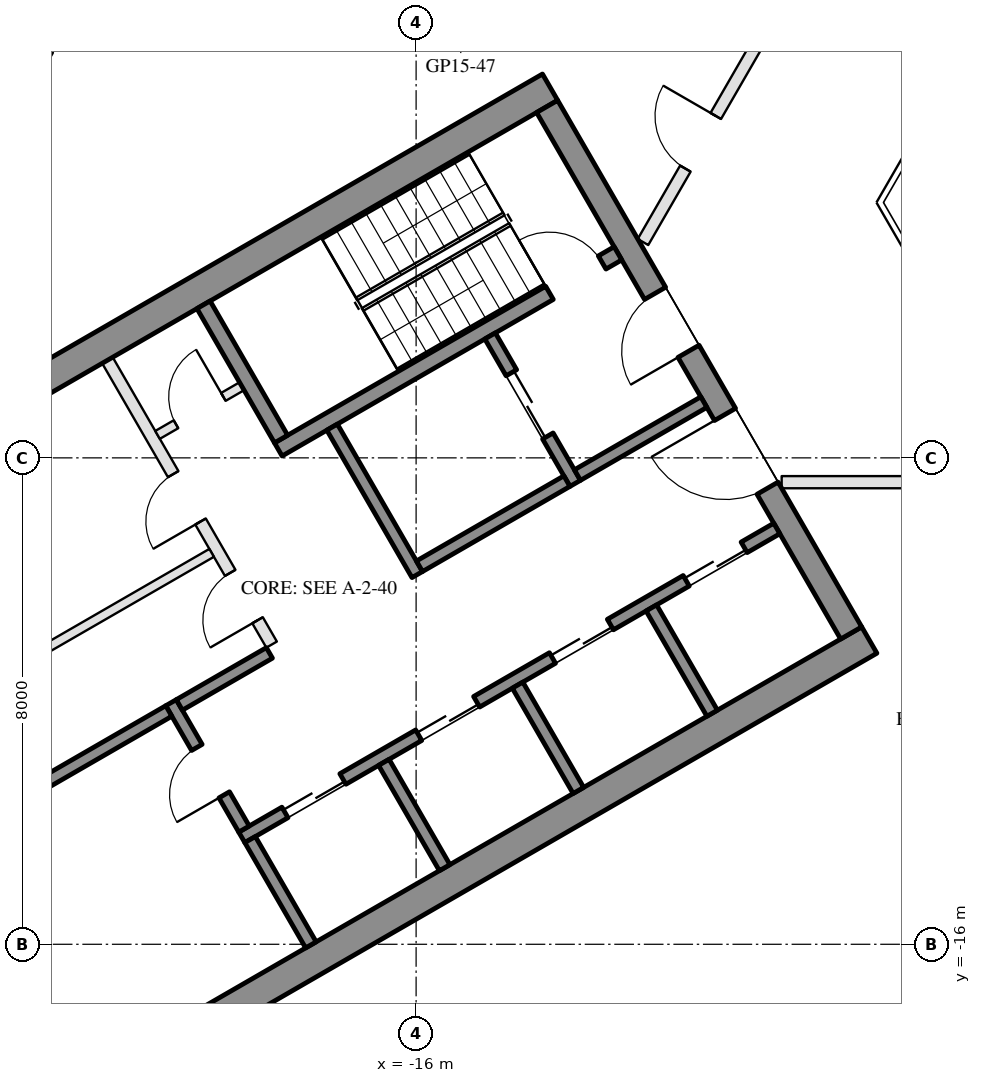
"""IFC4 building model, lengths in metres.
Left out: names, types, materials, properties, quantities, classifications, styles, units other than length and angle.
Written with IfcOpenShell. Run it as: python <this file> out.ifc"""

import sys

from ifc_helpers import new_model, si_unit, direction, frame, frame_2d, origin, place, context, subcontext, project, spatial, rectangle, extrude, element, fill, save


model = new_model("IFC4")
c1 = context("Model", 3, precision=1e-05, world=origin(), true_north=direction((0.0, 1.0)))
c2 = subcontext(c1, "Body", "Model", "MODEL_VIEW")
j1 = project(units=[si_unit("LENGTHUNIT", "METRE"), si_unit("PLANEANGLEUNIT", "RADIAN")], contexts=[c1])
p1 = place(None, origin())
s1 = spatial("IfcSite", under=j1, at=p1, CompositionType="ELEMENT")
p2 = place(p1, origin())
s2 = spatial("IfcBuilding", under=s1, at=p2, CompositionType="ELEMENT")
p3 = place(p2, frame((0.0, 0.0, 172.5)))
s3 = spatial("IfcBuildingStorey", under=s2, at=p3, CompositionType="ELEMENT", Elevation=172.5)
p4 = place(p3, frame((-20.309, 1.934, 0.0), z_axis=(0.0, 0.0, 1.0), x_axis=(-0.499992114976, -0.866029956157, 0.0)))
e1 = element("IfcWall", 1, at=p4, inside=s3, PredefinedType="SOLIDWALL", context=c2, shape_type="SweptSolid", body=[
    extrude(rectangle(XDim=6.74, YDim=0.35, at=frame_2d((3.37, 0.0))), origin(), (0.0, 0.0, 1.0), 3.55),
])
p5 = place(p4, frame((4.02, 0.0, 0.0)))
e2 = element("IfcOpeningElement", 2, at=p5, cuts=e1, PredefinedType="OPENING", context=c2, shape_type="SweptSolid", body=[
    extrude(rectangle(XDim=2.4, YDim=2.4, at=frame_2d((1.2, 1.2))), frame((0.0, 0.185, 0.0), z_axis=(0.0, -1.0, 0.0), x_axis=(1.0, 0.0, 0.0)), (0.0, 0.0, 1.0), 0.37),
])
p6 = place(p4, frame((0.77, 0.0, 0.3)))
e3 = element("IfcOpeningElement", 3, at=p6, cuts=e1, PredefinedType="OPENING", context=c2, shape_type="SweptSolid", body=[
    extrude(rectangle(XDim=2.9, YDim=2.65, at=frame_2d((1.45, 1.325))), frame((0.0, 0.185, 0.0), z_axis=(0.0, -1.0, 0.0), x_axis=(1.0, 0.0, 0.0)), (0.0, 0.0, 1.0), 0.37),
])
for number, where, z_axis, x_axis in (
    (4, (-13.797, -1.903, 0.0), (0.0, 0.0, 1.0), (-0.866, -0.5, 0.0)),
    (5, (-8.547, -10.997, 0.0), (0.0, 0.0, 1.0), (-0.866, -0.5, 0.0)),
):
    element("IfcWall", number, at=place(p3, frame(where, z_axis=z_axis, x_axis=x_axis)), inside=s3, PredefinedType="SHEAR", context=c2, shape_type="SweptSolid", body=[
        extrude(rectangle(XDim=14.837, YDim=0.5, at=frame_2d((7.418, 0.0))), origin(), (0.0, 0.0, 1.0), 3.5),
    ])
p7 = place(p3, frame((-13.845, -2.22, 0.0), z_axis=(0.0, 0.0, 1.0), x_axis=(0.500004234368, -0.866022959057, 0.0)))
e6 = element("IfcWall", 6, at=p7, inside=s3, PredefinedType="SHEAR", context=c2, shape_type="SweptSolid", body=[
    extrude(rectangle(XDim=10.0, YDim=0.4, at=frame_2d((5.0, 0.0))), origin(), (0.0, 0.0, 1.0), 3.5),
])
p8 = place(p7, frame((3.55, 0.0, 0.0)))
e7 = element("IfcOpeningElement", 7, at=p8, cuts=e6, PredefinedType="OPENING", context=c2, shape_type="SweptSolid", body=[
    extrude(rectangle(XDim=1.1, YDim=2.1, at=frame_2d((0.55, 1.05))), frame((0.0, 0.21, 0.0), z_axis=(0.0, -1.0, 0.0), x_axis=(1.0, 0.0, 0.0)), (0.0, 0.0, 1.0), 0.42),
])
p9 = place(p7, frame((5.85, 0.0, 0.0)))
e8 = element("IfcOpeningElement", 8, at=p9, cuts=e6, PredefinedType="OPENING", context=c2, shape_type="SweptSolid", body=[
    extrude(rectangle(XDim=1.4, YDim=2.1, at=frame_2d((0.7, 1.05))), frame((0.0, 0.21, 0.0), z_axis=(0.0, -1.0, 0.0), x_axis=(1.0, 0.0, 0.0)), (0.0, 0.0, 1.0), 0.42),
])
p10 = place(p3, frame((-12.681, -4.636, 0.0), z_axis=(0.0, 0.0, 1.0), x_axis=(-0.866021702275, -0.500006411147, 0.0)))
e9 = element("IfcWall", 9, at=p10, inside=s3, PredefinedType="SHEAR", context=c2, shape_type="SweptSolid", body=[
    extrude(rectangle(XDim=6.45, YDim=0.25, at=frame_2d((3.225, 0.0))), origin(), (0.0, 0.0, 1.0), 3.5),
])
p11 = place(p10, frame((0.3, 0.0, 0.0)))
e10 = element("IfcOpeningElement", 10, at=p11, cuts=e9, PredefinedType="OPENING", context=c2, shape_type="SweptSolid", body=[
    extrude(rectangle(XDim=1.0, YDim=2.1, at=frame_2d((0.5, 1.05))), frame((0.0, 0.135, 0.0), z_axis=(0.0, -1.0, 0.0), x_axis=(1.0, 0.0, 0.0)), (0.0, 0.0, 1.0), 0.27),
])
p12 = place(p3, frame((-19.496, -5.482, 0.0), z_axis=(0.0, 0.0, 1.0), x_axis=(0.499990435942, -0.866030925526, 0.0)))
e11 = element("IfcWall", 11, at=p12, inside=s3, PredefinedType="SHEAR", context=c2, shape_type="SweptSolid", body=[
    extrude(rectangle(XDim=2.55, YDim=0.25, at=frame_2d((1.275, 0.0))), origin(), (0.0, 0.0, 1.0), 3.5),
])
p13 = place(p3, frame((-17.381, -7.495, 0.0), z_axis=(0.0, 0.0, 1.0), x_axis=(0.500011755427, -0.866018616679, 0.0)))
e12 = element("IfcWall", 12, at=p13, inside=s3, PredefinedType="SHEAR", context=c2, shape_type="SweptSolid", body=[
    extrude(rectangle(XDim=2.8, YDim=0.2, at=frame_2d((1.4, 0.0))), origin(), (0.0, 0.0, 1.0), 3.5),
])
p14 = place(p3, frame((-14.783, -5.995, 0.0), z_axis=(0.0, 0.0, 1.0), x_axis=(0.49994636267, -0.866056369097, 0.0)))
e13 = element("IfcWall", 13, at=p14, inside=s3, PredefinedType="SHEAR", context=c2, shape_type="SweptSolid", body=[
    extrude(rectangle(XDim=2.8, YDim=0.2, at=frame_2d((1.4, 0.0))), origin(), (0.0, 0.0, 1.0), 3.5),
])
p15 = place(p14, frame((0.7, 0.0, 0.0)))
e14 = element("IfcOpeningElement", 14, at=p15, cuts=e13, PredefinedType="OPENING", context=c2, shape_type="SweptSolid", body=[
    extrude(rectangle(XDim=1.2, YDim=2.1, at=frame_2d((0.6, 1.05))), frame((0.0, 0.11, 0.0), z_axis=(0.0, -1.0, 0.0), x_axis=(1.0, 0.0, 0.0)), (0.0, 0.0, 1.0), 0.22),
])
p16 = place(p3, frame((-13.52, -8.383, 0.0), z_axis=(0.0, 0.0, 1.0), x_axis=(-0.866034573852, -0.49998411664, 0.0)))
e15 = element("IfcWall", 15, at=p16, inside=s3, PredefinedType="SHEAR", context=c2, shape_type="SweptSolid", body=[
    extrude(rectangle(XDim=2.8, YDim=0.2, at=frame_2d((1.4, 0.0))), origin(), (0.0, 0.0, 1.0), 3.5),
])
p17 = place(p3, frame((-11.268, -7.083, 0.0), z_axis=(0.0, 0.0, 1.0), x_axis=(-0.866050077142, -0.499957262057, 0.0)))
e16 = element("IfcWall", 16, at=p17, inside=s3, PredefinedType="SHEAR", context=c2, shape_type="SweptSolid", body=[
    extrude(rectangle(XDim=2.4, YDim=0.2, at=frame_2d((1.2, 0.0))), origin(), (0.0, 0.0, 1.0), 3.5),
])
p18 = place(p3, frame((-10.068, -9.162, 0.0), z_axis=(0.0, 0.0, 1.0), x_axis=(-0.866032725843, -0.499987317609, 0.0)))
e17 = element("IfcWall", 17, at=p18, inside=s3, PredefinedType="SHEAR", context=c2, shape_type="SweptSolid", body=[
    extrude(rectangle(XDim=10.16, YDim=0.2, at=frame_2d((5.08, 0.0))), origin(), (0.0, 0.0, 1.0), 3.5),
])
p19 = place(p18, frame((0.62, 0.0, 0.0)))
e18 = element("IfcOpeningElement", 18, at=p19, cuts=e17, PredefinedType="OPENING", context=c2, shape_type="SweptSolid", body=[
    extrude(rectangle(XDim=1.1, YDim=2.1, at=frame_2d((0.55, 1.05))), frame((0.0, 0.11, 0.0), z_axis=(0.0, -1.0, 0.0), x_axis=(1.0, 0.0, 0.0)), (0.0, 0.0, 1.0), 0.22),
])
p20 = place(p18, frame((3.16, 0.0, 0.0)))
e19 = element("IfcOpeningElement", 19, at=p20, cuts=e17, PredefinedType="OPENING", context=c2, shape_type="SweptSolid", body=[
    extrude(rectangle(XDim=1.1, YDim=2.1, at=frame_2d((0.55, 1.05))), frame((0.0, 0.11, 0.0), z_axis=(0.0, -1.0, 0.0), x_axis=(1.0, 0.0, 0.0)), (0.0, 0.0, 1.0), 0.22),
])
p21 = place(p18, frame((5.7, 0.0, 0.0)))
e20 = element("IfcOpeningElement", 20, at=p21, cuts=e17, PredefinedType="OPENING", context=c2, shape_type="SweptSolid", body=[
    extrude(rectangle(XDim=1.1, YDim=2.1, at=frame_2d((0.55, 1.05))), frame((0.0, 0.11, 0.0), z_axis=(0.0, -1.0, 0.0), x_axis=(1.0, 0.0, 0.0)), (0.0, 0.0, 1.0), 0.22),
])
p22 = place(p18, frame((8.24, 0.0, 0.0)))
e21 = element("IfcOpeningElement", 21, at=p22, cuts=e17, PredefinedType="OPENING", context=c2, shape_type="SweptSolid", body=[
    extrude(rectangle(XDim=1.1, YDim=2.1, at=frame_2d((0.55, 1.05))), frame((0.0, 0.11, 0.0), z_axis=(0.0, -1.0, 0.0), x_axis=(1.0, 0.0, 0.0)), (0.0, 0.0, 1.0), 0.22),
])
p23 = place(p3, frame((-20.031, -12.026, 0.0), z_axis=(0.0, 0.0, 1.0), x_axis=(0.500033551112, -0.866006032174, 0.0)))
e22 = element("IfcWall", 22, at=p23, inside=s3, PredefinedType="SHEAR", context=c2, shape_type="SweptSolid", body=[
    extrude(rectangle(XDim=2.4, YDim=0.2, at=frame_2d((1.2, 0.0))), origin(), (0.0, 0.0, 1.0), 3.5),
])
p24 = place(p23, frame((0.85, 0.0, 0.0)))
e23 = element("IfcOpeningElement", 23, at=p24, cuts=e22, PredefinedType="OPENING", context=c2, shape_type="SweptSolid", body=[
    extrude(rectangle(XDim=0.9, YDim=2.1, at=frame_2d((0.45, 1.05))), frame((0.0, 0.11, 0.0), z_axis=(0.0, -1.0, 0.0), x_axis=(1.0, 0.0, 0.0)), (0.0, 0.0, 1.0), 0.22),
])
p25 = place(p3, frame((-18.413, -11.208, 0.0), z_axis=(0.0, 0.0, 1.0), x_axis=(-0.866038183914, -0.499977863513, 0.0)))
e24 = element("IfcWall", 24, at=p25, inside=s3, PredefinedType="SHEAR", context=c2, shape_type="SweptSolid", body=[
    extrude(rectangle(XDim=1.71, YDim=0.2, at=frame_2d((0.855, 0.0))), origin(), (0.0, 0.0, 1.0), 3.5),
])
for number, where, z_axis, x_axis in (
    (25, (-12.131, -10.468, 0.0), (0.0, 0.0, 1.0), (0.5, -0.866, 0.0)),
    (26, (-14.331, -11.738, 0.0), (0.0, 0.0, 1.0), (0.5, -0.866, 0.0)),
    (27, (-16.531, -13.008, 0.0), (0.0, 0.0, 1.0), (0.5, -0.866, 0.0)),
    (28, (-18.73, -14.278, 0.0), (0.0, 0.0, 1.0), (0.5, -0.866, 0.0)),
):
    element("IfcWall", number, at=place(p3, frame(where, z_axis=z_axis, x_axis=x_axis)), inside=s3, PredefinedType="SHEAR", context=c2, shape_type="SweptSolid", body=[
        extrude(rectangle(XDim=2.0, YDim=0.2, at=frame_2d((1.0, 0.0))), origin(), (0.0, 0.0, 1.0), 3.5),
    ])
p26 = place(p3, frame((-20.067, -12.163, 0.0), z_axis=(0.0, 0.0, 1.0), x_axis=(-0.866055327414, -0.49994816717, 0.0)))
e29 = element("IfcWall", 29, at=p26, inside=s3, PredefinedType="SHEAR", context=c2, shape_type="SweptSolid", body=[
    extrude(rectangle(XDim=2.84, YDim=0.2, at=frame_2d((1.42, 0.0))), origin(), (0.0, 0.0, 1.0), 3.5),
])
p27 = place(p3, frame((-21.076, -6.395, 0.0), z_axis=(0.0, 0.0, 1.0), x_axis=(0.50001468107, -0.866016927499, 0.0)))
e30 = element("IfcWall", 30, at=p27, inside=s3, PredefinedType="PARTITIONING", context=c2, shape_type="SweptSolid", body=[
    extrude(rectangle(XDim=5.4, YDim=0.2, at=frame_2d((2.7, 0.0))), origin(), (0.0, 0.0, 1.0), 3.5),
])
p28 = place(p27, frame((2.163, 0.0, 0.0)))
e31 = element("IfcOpeningElement", 31, at=p28, cuts=e30, PredefinedType="OPENING", context=c2, shape_type="SweptSolid", body=[
    extrude(rectangle(XDim=0.9, YDim=2.1, at=frame_2d((0.45, 1.05))), frame((0.0, 0.11, 0.0), z_axis=(0.0, -1.0, 0.0), x_axis=(1.0, 0.0, 0.0)), (0.0, 0.0, 1.0), 0.22),
])
p29 = place(p27, frame((4.038, 0.0, 0.0)))
e32 = element("IfcOpeningElement", 32, at=p29, cuts=e30, PredefinedType="OPENING", context=c2, shape_type="SweptSolid", body=[
    extrude(rectangle(XDim=0.9, YDim=2.1, at=frame_2d((0.45, 1.05))), frame((0.0, 0.11, 0.0), z_axis=(0.0, -1.0, 0.0), x_axis=(1.0, 0.0, 0.0)), (0.0, 0.0, 1.0), 0.22),
])
p30 = place(p3, frame((-18.866, -6.822, 0.0), z_axis=(0.0, 0.0, 1.0), x_axis=(-0.866028054938, -0.499995408039, 0.0)))
e33 = element("IfcWall", 33, at=p30, inside=s3, PredefinedType="PARTITIONING", context=c2, shape_type="SweptSolid", body=[
    extrude(rectangle(XDim=1.6, YDim=0.15, at=frame_2d((0.8, 0.0))), origin(), (0.0, 0.0, 1.0), 3.5),
])
p31 = place(p30, frame((0.35, 0.0, 0.0)))
e34 = element("IfcOpeningElement", 34, at=p31, cuts=e33, PredefinedType="OPENING", context=c2, shape_type="SweptSolid", body=[
    extrude(rectangle(XDim=0.9, YDim=2.1, at=frame_2d((0.45, 1.05))), frame((0.0, 0.085, 0.0), z_axis=(0.0, -1.0, 0.0), x_axis=(1.0, 0.0, 0.0)), (0.0, 0.0, 1.0), 0.17),
])
p32 = place(p3, frame((-19.363, -9.562, 0.0), z_axis=(0.0, 0.0, 1.0), x_axis=(-0.866016523273, -0.500015381182, 0.0)))
e35 = element("IfcWall", 35, at=p32, inside=s3, PredefinedType="PARTITIONING", context=c2, shape_type="SweptSolid", body=[
    extrude(rectangle(XDim=6.95, YDim=0.15, at=frame_2d((3.475, 0.0))), origin(), (0.0, 0.0, 1.0), 3.5),
])
p33 = place(p3, frame((-3.697, -8.4, 0.0), z_axis=(0.0, 0.0, 1.0), x_axis=(-1.0, 0.0, 0.0)))
e36 = element("IfcWall", 36, at=p33, inside=s3, PredefinedType="PARTITIONING", context=c2, shape_type="SweptSolid", body=[
    extrude(rectangle(XDim=6.292, YDim=0.2, at=frame_2d((3.146, 0.0))), origin(), (0.0, 0.0, 1.0), 2.95),
])
p34 = place(p33, frame((2.646, 0.0, 0.0)))
e37 = element("IfcOpeningElement", 37, at=p34, cuts=e36, PredefinedType="OPENING", context=c2, shape_type="SweptSolid", body=[
    extrude(rectangle(XDim=1.0, YDim=2.1, at=frame_2d((0.5, 1.05))), frame((0.0, 0.11, 0.0), z_axis=(0.0, -1.0, 0.0), x_axis=(1.0, 0.0, 0.0)), (0.0, 0.0, 1.0), 0.22),
])
p35 = place(p3, frame((-12.269, -4.45, 0.0), z_axis=(0.0, 0.0, 1.0), x_axis=(0.500055316652, 0.865993464345, 0.0)))
e38 = element("IfcWall", 38, at=p35, inside=s3, PredefinedType="PARTITIONING", context=c2, shape_type="SweptSolid", body=[
    extrude(rectangle(XDim=3.788, YDim=0.2, at=frame_2d((1.894, 0.0))), origin(), (0.0, 0.0, 1.0), 2.95),
])
p36 = place(p35, frame((1.394, 0.0, 0.0)))
e39 = element("IfcOpeningElement", 39, at=p36, cuts=e38, PredefinedType="OPENING", context=c2, shape_type="SweptSolid", body=[
    extrude(rectangle(XDim=1.0, YDim=2.1, at=frame_2d((0.5, 1.05))), frame((0.0, 0.11, 0.0), z_axis=(0.0, -1.0, 0.0), x_axis=(1.0, 0.0, 0.0)), (0.0, 0.0, 1.0), 0.22),
])
p37 = place(p15, origin())
e40 = element("IfcDoor", 40, at=p37, inside=s3, OperationType="DOUBLE_DOOR_SLIDING", PredefinedType="DOOR", context=c2, shape_type="SweptSolid", body=[
    extrude(rectangle(XDim=1.2, YDim=2.1, at=frame_2d((0.6, 1.05))), frame((0.0, 0.025, 0.0), z_axis=(0.0, -1.0, 0.0), x_axis=(1.0, 0.0, 0.0)), (0.0, 0.0, 1.0), 0.05),
])
fill(e14, e40)
p38 = place(p31, frame((0.9, 0.0, 0.0), z_axis=(0.0, 0.0, 1.0), x_axis=(-1.0, 0.0, 0.0)))
e41 = element("IfcDoor", 41, at=p38, inside=s3, OperationType="SINGLE_SWING_RIGHT", PredefinedType="DOOR", context=c2, shape_type="SweptSolid", body=[
    extrude(rectangle(XDim=0.9, YDim=2.1, at=frame_2d((0.45, 1.05))), frame((0.0, 0.025, 0.0), z_axis=(0.0, -1.0, 0.0), x_axis=(1.0, 0.0, 0.0)), (0.0, 0.0, 1.0), 0.05),
])
fill(e34, e41)
p39 = place(p19, origin())
e42 = element("IfcDoor", 42, at=p39, inside=s3, OperationType="DOUBLE_DOOR_SLIDING", PredefinedType="DOOR", context=c2, shape_type="SweptSolid", body=[
    extrude(rectangle(XDim=1.1, YDim=2.1, at=frame_2d((0.55, 1.05))), frame((0.0, 0.025, 0.0), z_axis=(0.0, -1.0, 0.0), x_axis=(1.0, 0.0, 0.0)), (0.0, 0.0, 1.0), 0.05),
])
fill(e18, e42)
p40 = place(p20, origin())
e43 = element("IfcDoor", 43, at=p40, inside=s3, OperationType="DOUBLE_DOOR_SLIDING", PredefinedType="DOOR", context=c2, shape_type="SweptSolid", body=[
    extrude(rectangle(XDim=1.1, YDim=2.1, at=frame_2d((0.55, 1.05))), frame((0.0, 0.025, 0.0), z_axis=(0.0, -1.0, 0.0), x_axis=(1.0, 0.0, 0.0)), (0.0, 0.0, 1.0), 0.05),
])
fill(e19, e43)
p41 = place(p21, origin())
e44 = element("IfcDoor", 44, at=p41, inside=s3, OperationType="DOUBLE_DOOR_SLIDING", PredefinedType="DOOR", context=c2, shape_type="SweptSolid", body=[
    extrude(rectangle(XDim=1.1, YDim=2.1, at=frame_2d((0.55, 1.05))), frame((0.0, 0.025, 0.0), z_axis=(0.0, -1.0, 0.0), x_axis=(1.0, 0.0, 0.0)), (0.0, 0.0, 1.0), 0.05),
])
fill(e20, e44)
p42 = place(p22, origin())
e45 = element("IfcDoor", 45, at=p42, inside=s3, OperationType="DOUBLE_DOOR_SLIDING", PredefinedType="DOOR", context=c2, shape_type="SweptSolid", body=[
    extrude(rectangle(XDim=1.1, YDim=2.1, at=frame_2d((0.55, 1.05))), frame((0.0, 0.025, 0.0), z_axis=(0.0, -1.0, 0.0), x_axis=(1.0, 0.0, 0.0)), (0.0, 0.0, 1.0), 0.05),
])
fill(e21, e45)
p43 = place(p24, frame((0.9, 0.0, 0.0), z_axis=(0.0, 0.0, 1.0), x_axis=(-1.0, 0.0, 0.0)))
e46 = element("IfcDoor", 46, at=p43, inside=s3, OperationType="SINGLE_SWING_LEFT", PredefinedType="DOOR", context=c2, shape_type="SweptSolid", body=[
    extrude(rectangle(XDim=0.9, YDim=2.1, at=frame_2d((0.45, 1.05))), frame((0.0, 0.025, 0.0), z_axis=(0.0, -1.0, 0.0), x_axis=(1.0, 0.0, 0.0)), (0.0, 0.0, 1.0), 0.05),
])
fill(e23, e46)
p44 = place(p28, frame((0.9, 0.0, 0.0), z_axis=(0.0, 0.0, 1.0), x_axis=(-1.0, 0.0, 0.0)))
e47 = element("IfcDoor", 47, at=p44, inside=s3, OperationType="SINGLE_SWING_LEFT", PredefinedType="DOOR", context=c2, shape_type="SweptSolid", body=[
    extrude(rectangle(XDim=0.9, YDim=2.1, at=frame_2d((0.45, 1.05))), frame((0.0, 0.025, 0.0), z_axis=(0.0, -1.0, 0.0), x_axis=(1.0, 0.0, 0.0)), (0.0, 0.0, 1.0), 0.05),
])
fill(e31, e47)
p45 = place(p29, frame((0.9, 0.0, 0.0), z_axis=(0.0, 0.0, 1.0), x_axis=(-1.0, 0.0, 0.0)))
e48 = element("IfcDoor", 48, at=p45, inside=s3, OperationType="SINGLE_SWING_LEFT", PredefinedType="DOOR", context=c2, shape_type="SweptSolid", body=[
    extrude(rectangle(XDim=0.9, YDim=2.1, at=frame_2d((0.45, 1.05))), frame((0.0, 0.025, 0.0), z_axis=(0.0, -1.0, 0.0), x_axis=(1.0, 0.0, 0.0)), (0.0, 0.0, 1.0), 0.05),
])
fill(e32, e48)
p46 = place(p8, frame((1.1, 0.0, 0.0), z_axis=(0.0, 0.0, 1.0), x_axis=(-1.0, 0.0, 0.0)))
e49 = element("IfcDoor", 49, at=p46, inside=s3, OperationType="SINGLE_SWING_LEFT", PredefinedType="DOOR", context=c2, shape_type="SweptSolid", body=[
    extrude(rectangle(XDim=1.1, YDim=2.1, at=frame_2d((0.55, 1.05))), frame((0.0, 0.025, 0.0), z_axis=(0.0, -1.0, 0.0), x_axis=(1.0, 0.0, 0.0)), (0.0, 0.0, 1.0), 0.05),
])
fill(e7, e49)
p47 = place(p9, frame((1.4, 0.0, 0.0), z_axis=(0.0, 0.0, 1.0), x_axis=(-1.0, 0.0, 0.0)))
e50 = element("IfcDoor", 50, at=p47, inside=s3, OperationType="DOUBLE_DOOR_SINGLE_SWING", PredefinedType="DOOR", context=c2, shape_type="SweptSolid", body=[
    extrude(rectangle(XDim=1.4, YDim=2.1, at=frame_2d((0.7, 1.05))), frame((0.0, 0.025, 0.0), z_axis=(0.0, -1.0, 0.0), x_axis=(1.0, 0.0, 0.0)), (0.0, 0.0, 1.0), 0.05),
])
fill(e8, e50)
p48 = place(p11, frame((1.0, 0.0, 0.0), z_axis=(0.0, 0.0, 1.0), x_axis=(-1.0, 0.0, 0.0)))
e51 = element("IfcDoor", 51, at=p48, inside=s3, OperationType="SINGLE_SWING_LEFT", PredefinedType="DOOR", context=c2, shape_type="SweptSolid", body=[
    extrude(rectangle(XDim=1.0, YDim=2.1, at=frame_2d((0.5, 1.05))), frame((0.0, 0.025, 0.0), z_axis=(0.0, -1.0, 0.0), x_axis=(1.0, 0.0, 0.0)), (0.0, 0.0, 1.0), 0.05),
])
fill(e10, e51)
p49 = place(p36, origin())
e52 = element("IfcDoor", 52, at=p49, inside=s3, OperationType="SINGLE_SWING_RIGHT", PredefinedType="DOOR", context=c2, shape_type="SweptSolid", body=[
    extrude(rectangle(XDim=1.0, YDim=2.1, at=frame_2d((0.5, 1.05))), frame((0.0, 0.025, 0.0), z_axis=(0.0, -1.0, 0.0), x_axis=(1.0, 0.0, 0.0)), (0.0, 0.0, 1.0), 0.05),
])
fill(e39, e52)
save(model, sys.argv[1])
